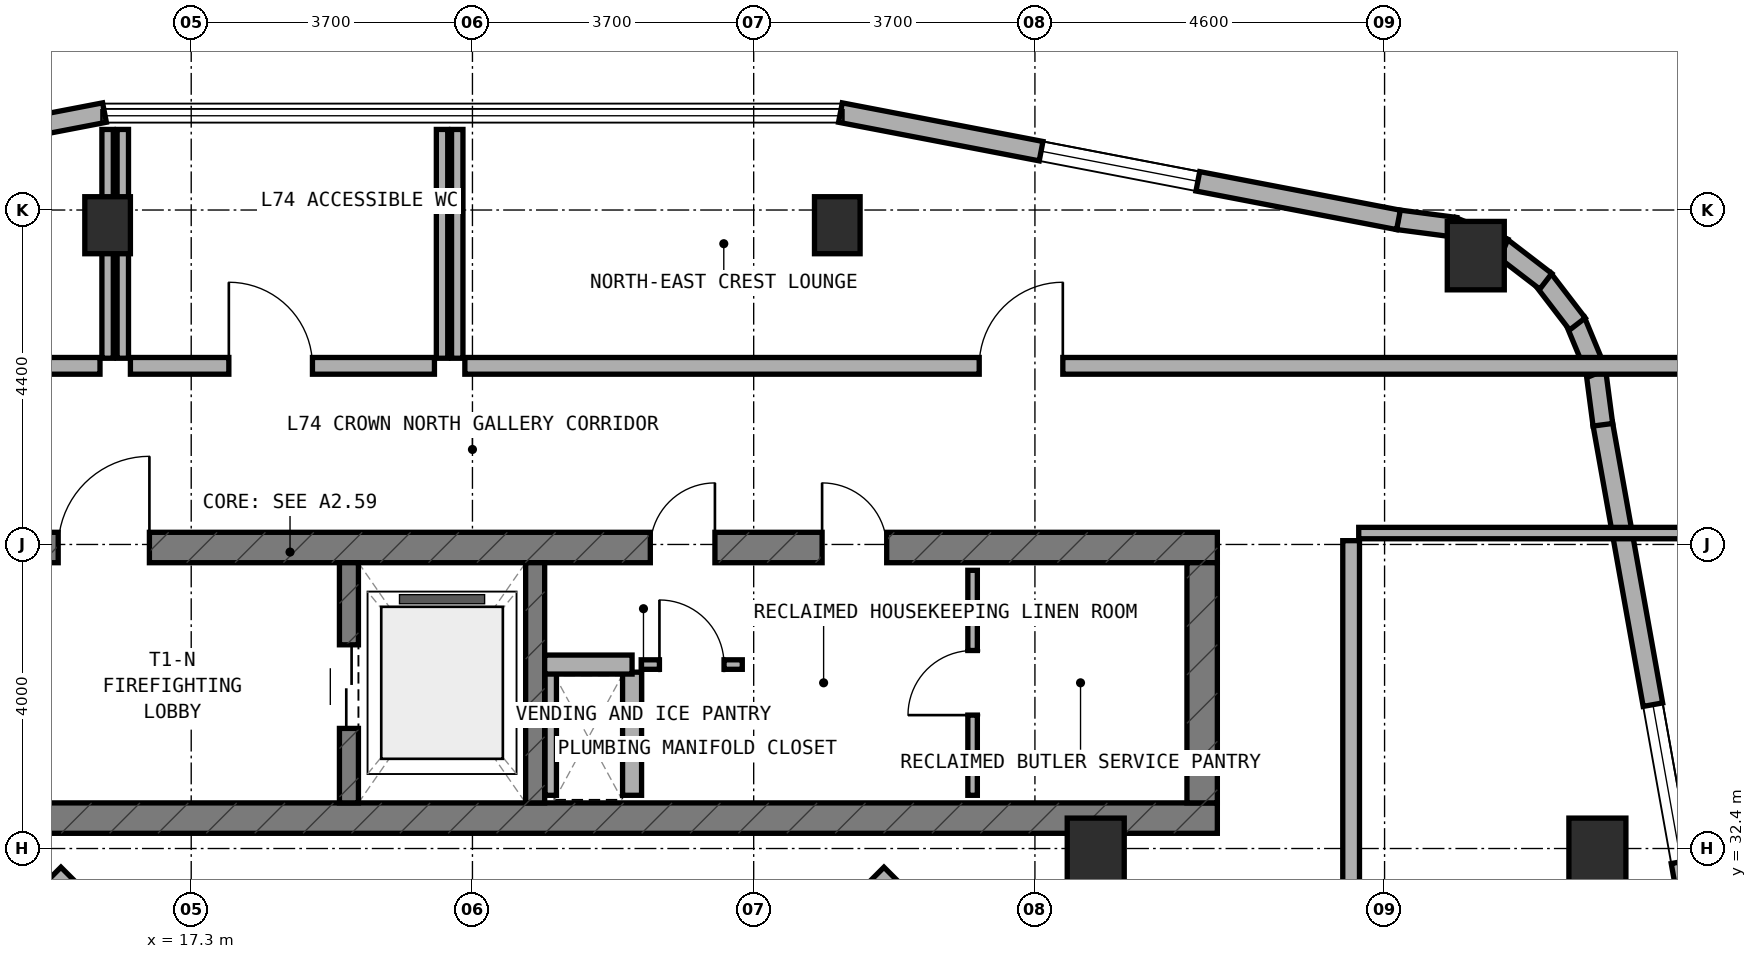
"""IFC4 building model, lengths in metres.
Left out: names, types, materials, properties, quantities, classifications, styles, units other than length and angle.
Written with IfcOpenShell. Run it as: python <this file> out.ifc"""

import sys

from ifc_helpers import new_model, si_unit, direction, frame, frame_2d, origin, origin_2d, place, context, subcontext, project, spatial, rectangle, extrude, element, fill, save


model = new_model("IFC4")
c1 = context("Model", 3, precision=1e-05, world=origin(), true_north=direction((0.0, 1.0)))
c2 = subcontext(c1, "Body", "Model", "MODEL_VIEW")
j1 = project(units=[si_unit("LENGTHUNIT", "METRE"), si_unit("PLANEANGLEUNIT", "RADIAN")], contexts=[c1])
p1 = place(None, origin())
s1 = spatial("IfcSite", under=j1, at=p1, CompositionType="ELEMENT")
p2 = place(p1, origin())
s2 = spatial("IfcBuilding", under=s1, at=p2, CompositionType="ELEMENT")
p3 = place(p2, frame((0.0, 0.0, 272.0)))
s3 = spatial("IfcBuildingStorey", under=s2, at=p3, CompositionType="ELEMENT", Elevation=272.0)
p4 = place(p3, frame((6.4, 32.8, 0.0), z_axis=(0.0, 0.0, 1.0), x_axis=(1.0, 0.0, 0.0)))
e1 = element("IfcWall", 1, at=p4, inside=s3, PredefinedType="SHEAR", context=c2, shape_type="SweptSolid", body=[
    extrude(rectangle(XDim=24.4, YDim=0.4, at=frame_2d((12.2, 0.0))), origin(), (0.0, 0.0, 1.0), 4.56),
])
p5 = place(p4, frame((6.05, 0.0, 0.0)))
e2 = element("IfcOpeningElement", 2, at=p5, cuts=e1, PredefinedType="OPENING", context=c2, shape_type="SweptSolid", body=[
    extrude(rectangle(XDim=1.1, YDim=2.15, at=frame_2d((0.55, 1.075))), frame((0.0, 0.21, 0.0), z_axis=(0.0, -1.0, 0.0), x_axis=(1.0, 0.0, 0.0)), (0.0, 0.0, 1.0), 0.42),
])
p6 = place(p3, frame((6.4, 36.36, 0.0), z_axis=(0.0, 0.0, 1.0), x_axis=(1.0, 0.0, 0.0)))
e3 = element("IfcWall", 3, at=p6, inside=s3, PredefinedType="SHEAR", context=c2, shape_type="SweptSolid", body=[
    extrude(rectangle(XDim=24.4, YDim=0.4, at=frame_2d((12.2, 0.0))), origin(), (0.0, 0.0, 1.0), 4.56),
])
p7 = place(p6, frame((9.15, 0.0, 0.0)))
e4 = element("IfcOpeningElement", 4, at=p7, cuts=e3, PredefinedType="OPENING", context=c2, shape_type="SweptSolid", body=[
    extrude(rectangle(XDim=1.2, YDim=2.15, at=frame_2d((0.6, 1.075))), frame((0.0, 0.21, 0.0), z_axis=(0.0, -1.0, 0.0), x_axis=(1.0, 0.0, 0.0)), (0.0, 0.0, 1.0), 0.42),
])
p8 = place(p6, frame((19.2, 0.0, 0.0)))
e5 = element("IfcOpeningElement", 5, at=p8, cuts=e3, PredefinedType="OPENING", context=c2, shape_type="SweptSolid", body=[
    extrude(rectangle(XDim=0.85, YDim=2.1, at=frame_2d((0.425, 1.05))), frame((0.0, 0.21, 0.0), z_axis=(0.0, -1.0, 0.0), x_axis=(1.0, 0.0, 0.0)), (0.0, 0.0, 1.0), 0.42),
])
p9 = place(p6, frame((16.94, 0.0, 0.0)))
e6 = element("IfcOpeningElement", 6, at=p9, cuts=e3, PredefinedType="OPENING", context=c2, shape_type="SweptSolid", body=[
    extrude(rectangle(XDim=0.85, YDim=2.1, at=frame_2d((0.425, 1.05))), frame((0.0, 0.21, 0.0), z_axis=(0.0, -1.0, 0.0), x_axis=(1.0, 0.0, 0.0)), (0.0, 0.0, 1.0), 0.42),
])
p10 = place(p3, frame((30.6, 33.0, 0.0), z_axis=(0.0, 0.0, 1.0), x_axis=(0.0, 1.0, 0.0)))
e7 = element("IfcWall", 7, at=p10, inside=s3, PredefinedType="SHEAR", context=c2, shape_type="SweptSolid", body=[
    extrude(rectangle(XDim=3.16, YDim=0.4, at=frame_2d((1.58, 0.0))), origin(), (0.0, 0.0, 1.0), 4.56),
])
p11 = place(p3, frame((19.375, 33.0, 0.0), z_axis=(0.0, 0.0, 1.0), x_axis=(0.0, 1.0, 0.0)))
e8 = element("IfcWall", 8, at=p11, inside=s3, PredefinedType="STANDARD", context=c2, shape_type="SweptSolid", body=[
    extrude(rectangle(XDim=3.16, YDim=0.25, at=frame_2d((1.58, 0.0))), origin(), (0.0, 0.0, 1.0), 4.52),
])
p12 = place(p11, frame((0.98, 0.0, 0.0)))
e9 = element("IfcOpeningElement", 9, at=p12, cuts=e8, PredefinedType="OPENING", context=c2, shape_type="SweptSolid", body=[
    extrude(rectangle(XDim=1.1, YDim=2.15, at=frame_2d((0.55, 1.075))), frame((0.0, 0.135, 0.0), z_axis=(0.0, -1.0, 0.0), x_axis=(1.0, 0.0, 0.0)), (0.0, 0.0, 1.0), 0.27),
])
p13 = place(p3, frame((21.825, 33.0, 0.0), z_axis=(0.0, 0.0, 1.0), x_axis=(0.0, 1.0, 0.0)))
e10 = element("IfcWall", 10, at=p13, inside=s3, PredefinedType="STANDARD", context=c2, shape_type="SweptSolid", body=[
    extrude(rectangle(XDim=3.16, YDim=0.25, at=frame_2d((1.58, 0.0))), origin(), (0.0, 0.0, 1.0), 4.52),
])
for number, where, z_axis, x_axis in (
    (11, (16.2, 40.6, 0.0), (0.0, 0.0, 1.0), (1.0, 0.0, 0.0)),
    (12, (25.8, 40.6, 0.0), (0.0, 0.0, 1.0), (1.0, 0.0, 0.0)),
):
    element("IfcColumn", number, at=place(p3, frame(where, z_axis=z_axis, x_axis=x_axis)), inside=s3, PredefinedType="COLUMN", context=c2, shape_type="SweptSolid", body=[
        extrude(rectangle(XDim=0.6, YDim=0.75, at=origin_2d()), origin(), (0.0, 0.0, 1.0), 4.8),
    ])
for number, where, z_axis, x_axis in (
    (13, (34.2, 40.2, 0.0), (0.0, 0.0, 1.0), (1.0, 0.0, 0.0)),
    (14, (35.8, 32.35, 0.0), (0.0, 0.0, 1.0), (1.0, 0.0, 0.0)),
    (15, (29.2, 32.35, 0.0), (0.0, 0.0, 1.0), (1.0, 0.0, 0.0)),
):
    element("IfcColumn", number, at=place(p3, frame(where, z_axis=z_axis, x_axis=x_axis)), inside=s3, PredefinedType="COLUMN", context=c2, shape_type="SweptSolid", body=[
        extrude(rectangle(XDim=0.75, YDim=0.9, at=origin_2d()), origin(), (0.0, 0.0, 1.0), 4.8),
    ])
p14 = place(p3, frame((37.282, 30.083, 0.0), z_axis=(0.0, 0.0, 1.0), x_axis=(-0.175766426993, 0.984431898682, 0.0)))
e16 = element("IfcWall", 16, at=p14, inside=s3, PredefinedType="STANDARD", context=c2, shape_type="SweptSolid", body=[
    extrude(rectangle(XDim=8.027, YDim=0.26, at=frame_2d((4.014, 0.0))), origin(), (0.0, 0.0, 1.0), 2.74),
])
p15 = place(p14, frame((2.176, 0.0, 0.85)))
e17 = element("IfcOpeningElement", 17, at=p15, cuts=e16, PredefinedType="OPENING", context=c2, shape_type="SweptSolid", body=[
    extrude(rectangle(XDim=2.1, YDim=1.5, at=frame_2d((1.05, 0.75))), frame((0.0, 0.14, 0.0), z_axis=(0.0, -1.0, 0.0), x_axis=(1.0, 0.0, 0.0)), (0.0, 0.0, 1.0), 0.28),
])
p16 = place(p3, frame((35.872, 37.975, 0.0), z_axis=(0.0, 0.0, 1.0), x_axis=(-0.130255288807, 0.991480488834, 0.0)))
e18 = element("IfcWall", 18, at=p16, inside=s3, PredefinedType="STANDARD", context=c2, shape_type="SweptSolid", body=[
    extrude(rectangle(XDim=0.729, YDim=0.26, at=frame_2d((0.365, 0.0))), origin(), (0.0, 0.0, 1.0), 2.74),
])
p17 = place(p3, frame((35.795, 38.652, 0.0), z_axis=(0.0, 0.0, 1.0), x_axis=(-0.383267045233, 0.923637576129, 0.0)))
e19 = element("IfcWall", 19, at=p17, inside=s3, PredefinedType="STANDARD", context=c2, shape_type="SweptSolid", body=[
    extrude(rectangle(XDim=0.746, YDim=0.26, at=frame_2d((0.373, 0.0))), origin(), (0.0, 0.0, 1.0), 2.74),
])
for number, where, z_axis, x_axis in (
    (20, (35.537, 39.301, 0.0), (0.0, 0.0, 1.0), (-0.609, 0.793, 0.0)),
    (21, (35.121, 39.862, 0.0), (0.0, 0.0, 1.0), (-0.794, 0.608, 0.0)),
    (22, (34.573, 40.295, 0.0), (0.0, 0.0, 1.0), (-0.924, 0.384, 0.0)),
):
    element("IfcWall", number, at=place(p3, frame(where, z_axis=z_axis, x_axis=x_axis)), inside=s3, PredefinedType="STANDARD", context=c2, shape_type="SweptSolid", body=[
        extrude(rectangle(XDim=0.746, YDim=0.26, at=frame_2d((0.373, 0.0))), origin(), (0.0, 0.0, 1.0), 2.74),
    ])
p18 = place(p3, frame((33.933, 40.573, 0.0), z_axis=(0.0, 0.0, 1.0), x_axis=(-0.991559404866, 0.129653178221, 0.0)))
e23 = element("IfcWall", 23, at=p18, inside=s3, PredefinedType="STANDARD", context=c2, shape_type="SweptSolid", body=[
    extrude(rectangle(XDim=0.764, YDim=0.26, at=frame_2d((0.382, 0.0))), origin(), (0.0, 0.0, 1.0), 2.74),
])
p19 = place(p3, frame((33.183, 40.67, 0.0), z_axis=(0.0, 0.0, 1.0), x_axis=(-0.982002021426, 0.188870405079, 0.0)))
e24 = element("IfcWall", 24, at=p19, inside=s3, PredefinedType="STANDARD", context=c2, shape_type="SweptSolid", body=[
    extrude(rectangle(XDim=7.477, YDim=0.26, at=frame_2d((3.738, 0.0))), origin(), (0.0, 0.0, 1.0), 2.74),
])
p20 = place(p19, frame((2.688, 0.0, 0.85)))
e25 = element("IfcOpeningElement", 25, at=p20, cuts=e24, PredefinedType="OPENING", context=c2, shape_type="SweptSolid", body=[
    extrude(rectangle(XDim=2.1, YDim=1.5, at=frame_2d((1.05, 0.75))), frame((0.0, 0.14, 0.0), z_axis=(0.0, -1.0, 0.0), x_axis=(1.0, 0.0, 0.0)), (0.0, 0.0, 1.0), 0.28),
])
p21 = place(p3, frame((16.159, 42.082, 0.0), z_axis=(0.0, 0.0, 1.0), x_axis=(-0.982002021426, -0.188870405079, 0.0)))
e26 = element("IfcWall", 26, at=p21, inside=s3, PredefinedType="STANDARD", context=c2, shape_type="SweptSolid", body=[
    extrude(rectangle(XDim=7.477, YDim=0.26, at=frame_2d((3.738, 0.0))), origin(), (0.0, 0.0, 1.0), 2.74),
])
p22 = place(p21, frame((2.728, 0.0, 0.85)))
e27 = element("IfcOpeningElement", 27, at=p22, cuts=e26, PredefinedType="OPENING", context=c2, shape_type="SweptSolid", body=[
    extrude(rectangle(XDim=2.1, YDim=1.5, at=frame_2d((1.05, 0.75))), frame((0.0, 0.14, 0.0), z_axis=(0.0, -1.0, 0.0), x_axis=(1.0, 0.0, 0.0)), (0.0, 0.0, 1.0), 0.28),
])
for number, where, z_axis, x_axis in (
    (28, (27.956, 30.428, 0.0), (0.0, 0.0, 1.0), (-0.707, 0.707, 0.0)),
    (29, (15.678, 32.062, 0.0), (0.0, 0.0, 1.0), (-0.707, -0.707, 0.0)),
):
    element("IfcWall", number, at=place(p3, frame(where, z_axis=z_axis, x_axis=x_axis)), inside=s3, PredefinedType="STANDARD", context=c2, shape_type="SweptSolid", body=[
        extrude(rectangle(XDim=2.311, YDim=0.26, at=frame_2d((1.155, 0.0))), origin(), (0.0, 0.0, 1.0), 2.74),
    ])
p23 = place(p3, frame((27.58, 33.1, 0.0), z_axis=(0.0, 0.0, 1.0), x_axis=(0.0, 1.0, 0.0)))
e30 = element("IfcWall", 30, at=p23, inside=s3, PredefinedType="PARTITIONING", context=c2, shape_type="SweptSolid", body=[
    extrude(rectangle(XDim=2.96, YDim=0.125, at=frame_2d((1.48, 0.0))), origin(), (0.0, 0.0, 1.0), 2.72),
])
p24 = place(p23, frame((1.055, 0.0, 0.0)))
e31 = element("IfcOpeningElement", 31, at=p24, cuts=e30, PredefinedType="OPENING", context=c2, shape_type="SweptSolid", body=[
    extrude(rectangle(XDim=0.85, YDim=2.1, at=frame_2d((0.425, 1.05))), frame((0.0, 0.073, 0.0), z_axis=(0.0, -1.0, 0.0), x_axis=(1.0, 0.0, 0.0)), (0.0, 0.0, 1.0), 0.145),
])
p25 = place(p3, frame((22.03, 33.1, 0.0), z_axis=(0.0, 0.0, 1.0), x_axis=(0.0, 1.0, 0.0)))
e32 = element("IfcWall", 32, at=p25, inside=s3, PredefinedType="PARTITIONING", context=c2, shape_type="SweptSolid", body=[
    extrude(rectangle(XDim=1.62, YDim=0.15, at=frame_2d((0.81, 0.0))), origin(), (0.0, 0.0, 1.0), 2.72),
])
p26 = place(p3, frame((23.1, 33.1, 0.0), z_axis=(0.0, 0.0, 1.0), x_axis=(0.0, 1.0, 0.0)))
e33 = element("IfcWall", 33, at=p26, inside=s3, PredefinedType="SOLIDWALL", context=c2, shape_type="SweptSolid", body=[
    extrude(rectangle(XDim=1.62, YDim=0.25, at=frame_2d((0.81, 0.0))), origin(), (0.0, 0.0, 1.0), 2.72),
])
p27 = place(p3, frame((21.95, 34.82, 0.0), z_axis=(0.0, 0.0, 1.0), x_axis=(1.0, 0.0, 0.0)))
e34 = element("IfcWall", 34, at=p27, inside=s3, PredefinedType="SOLIDWALL", context=c2, shape_type="SweptSolid", body=[
    extrude(rectangle(XDim=1.15, YDim=0.25, at=frame_2d((0.575, 0.0))), origin(), (0.0, 0.0, 1.0), 2.72),
])
p28 = place(p3, frame((23.22, 34.82, 0.0), z_axis=(0.0, 0.0, 1.0), x_axis=(1.0, 0.0, 0.0)))
e35 = element("IfcWall", 35, at=p28, inside=s3, PredefinedType="PARTITIONING", context=c2, shape_type="SweptSolid", body=[
    extrude(rectangle(XDim=1.33, YDim=0.125, at=frame_2d((0.665, 0.0))), origin(), (0.0, 0.0, 1.0), 2.72),
])
p29 = place(p28, frame((0.24, 0.0, 0.0)))
e36 = element("IfcOpeningElement", 36, at=p29, cuts=e35, PredefinedType="OPENING", context=c2, shape_type="SweptSolid", body=[
    extrude(rectangle(XDim=0.85, YDim=2.1, at=frame_2d((0.425, 1.05))), frame((0.0, 0.073, 0.0), z_axis=(0.0, -1.0, 0.0), x_axis=(1.0, 0.0, 0.0)), (0.0, 0.0, 1.0), 0.145),
])
p30 = place(p3, frame((32.66, 36.55, 0.0), z_axis=(0.0, 0.0, 1.0), x_axis=(1.0, 0.0, 0.0)))
e37 = element("IfcWall", 37, at=p30, inside=s3, PredefinedType="PARTITIONING", context=c2, shape_type="SweptSolid", body=[
    extrude(rectangle(XDim=4.4, YDim=0.15, at=frame_2d((2.2, 0.0))), origin(), (0.0, 0.0, 1.0), 2.72),
])
p31 = place(p3, frame((32.56, 13.55, 0.0), z_axis=(0.0, 0.0, 1.0), x_axis=(0.0, 1.0, 0.0)))
e38 = element("IfcWall", 38, at=p31, inside=s3, PredefinedType="SOLIDWALL", context=c2, shape_type="SweptSolid", body=[
    extrude(rectangle(XDim=22.9, YDim=0.22, at=frame_2d((11.45, 0.0))), origin(), (0.0, 0.0, 1.0), 2.72),
])
p32 = place(p31, frame((9.8, 0.0, 0.0)))
e39 = element("IfcOpeningElement", 39, at=p32, cuts=e38, PredefinedType="OPENING", context=c2, shape_type="SweptSolid", body=[
    extrude(rectangle(XDim=1.1, YDim=2.1, at=frame_2d((0.55, 1.05))), frame((0.0, 0.12, 0.0), z_axis=(0.0, -1.0, 0.0), x_axis=(1.0, 0.0, 0.0)), (0.0, 0.0, 1.0), 0.24),
])
p33 = place(p3, frame((16.2, 38.85, 0.0), z_axis=(0.0, 0.0, 1.0), x_axis=(0.0, 1.0, 0.0)))
e40 = element("IfcWall", 40, at=p33, inside=s3, PredefinedType="PARTITIONING", context=c2, shape_type="SweptSolid", body=[
    extrude(rectangle(XDim=3.01, YDim=0.15, at=frame_2d((1.505, 0.0))), origin(), (0.0, 0.0, 1.0), 2.72),
])
p34 = place(p3, frame((4.94, 38.75, 0.0), z_axis=(0.0, 0.0, 1.0), x_axis=(1.0, 0.0, 0.0)))
e41 = element("IfcWall", 41, at=p34, inside=s3, PredefinedType="SOLIDWALL", context=c2, shape_type="SweptSolid", body=[
    extrude(rectangle(XDim=11.16, YDim=0.22, at=frame_2d((5.58, 0.0))), origin(), (0.0, 0.0, 1.0), 2.72),
])
p35 = place(p34, frame((4.517, 0.0, 0.0)))
e42 = element("IfcOpeningElement", 42, at=p35, cuts=e41, PredefinedType="OPENING", context=c2, shape_type="SweptSolid", body=[
    extrude(rectangle(XDim=1.1, YDim=2.1, at=frame_2d((0.55, 1.05))), frame((0.0, 0.12, 0.0), z_axis=(0.0, -1.0, 0.0), x_axis=(1.0, 0.0, 0.0)), (0.0, 0.0, 1.0), 0.24),
])
for number, where, z_axis, x_axis in (
    (43, (16.4, 38.85, 0.0), (0.0, 0.0, 1.0), (0.0, 1.0, 0.0)),
    (44, (20.6, 38.85, 0.0), (0.0, 0.0, 1.0), (0.0, 1.0, 0.0)),
):
    element("IfcWall", number, at=place(p3, frame(where, z_axis=z_axis, x_axis=x_axis)), inside=s3, PredefinedType="PARTITIONING", context=c2, shape_type="SweptSolid", body=[
        extrude(rectangle(XDim=3.01, YDim=0.15, at=frame_2d((1.505, 0.0))), origin(), (0.0, 0.0, 1.0), 2.72),
    ])
p36 = place(p3, frame((16.5, 38.75, 0.0), z_axis=(0.0, 0.0, 1.0), x_axis=(1.0, 0.0, 0.0)))
e45 = element("IfcWall", 45, at=p36, inside=s3, PredefinedType="SOLIDWALL", context=c2, shape_type="SweptSolid", body=[
    extrude(rectangle(XDim=4.0, YDim=0.22, at=frame_2d((2.0, 0.0))), origin(), (0.0, 0.0, 1.0), 2.72),
])
p37 = place(p36, frame((1.295, 0.0, 0.0)))
e46 = element("IfcOpeningElement", 46, at=p37, cuts=e45, PredefinedType="OPENING", context=c2, shape_type="SweptSolid", body=[
    extrude(rectangle(XDim=1.1, YDim=2.1, at=frame_2d((0.55, 1.05))), frame((0.0, 0.12, 0.0), z_axis=(0.0, -1.0, 0.0), x_axis=(1.0, 0.0, 0.0)), (0.0, 0.0, 1.0), 0.24),
])
p38 = place(p3, frame((20.8, 38.85, 0.0), z_axis=(0.0, 0.0, 1.0), x_axis=(0.0, 1.0, 0.0)))
e47 = element("IfcWall", 47, at=p38, inside=s3, PredefinedType="PARTITIONING", context=c2, shape_type="SweptSolid", body=[
    extrude(rectangle(XDim=3.01, YDim=0.15, at=frame_2d((1.505, 0.0))), origin(), (0.0, 0.0, 1.0), 2.72),
])
p39 = place(p3, frame((20.9, 38.75, 0.0), z_axis=(0.0, 0.0, 1.0), x_axis=(1.0, 0.0, 0.0)))
e48 = element("IfcWall", 48, at=p39, inside=s3, PredefinedType="SOLIDWALL", context=c2, shape_type="SweptSolid", body=[
    extrude(rectangle(XDim=16.16, YDim=0.22, at=frame_2d((8.08, 0.0))), origin(), (0.0, 0.0, 1.0), 2.72),
])
p40 = place(p39, frame((6.767, 0.0, 0.0)))
e49 = element("IfcOpeningElement", 49, at=p40, cuts=e48, PredefinedType="OPENING", context=c2, shape_type="SweptSolid", body=[
    extrude(rectangle(XDim=1.1, YDim=2.1, at=frame_2d((0.55, 1.05))), frame((0.0, 0.12, 0.0), z_axis=(0.0, -1.0, 0.0), x_axis=(1.0, 0.0, 0.0)), (0.0, 0.0, 1.0), 0.24),
])
p41 = place(p15, origin())
e50 = element("IfcWindow", 50, at=p41, inside=s3, PartitioningType="SINGLE_PANEL", PredefinedType="WINDOW", context=c2, shape_type="SweptSolid", body=[
    extrude(rectangle(XDim=2.1, YDim=1.5, at=frame_2d((1.05, 0.75))), frame((0.0, 0.03, 0.0), z_axis=(0.0, -1.0, 0.0), x_axis=(1.0, 0.0, 0.0)), (0.0, 0.0, 1.0), 0.06),
])
fill(e17, e50)
p42 = place(p20, origin())
e51 = element("IfcWindow", 51, at=p42, inside=s3, PartitioningType="SINGLE_PANEL", PredefinedType="WINDOW", context=c2, shape_type="SweptSolid", body=[
    extrude(rectangle(XDim=2.1, YDim=1.5, at=frame_2d((1.05, 0.75))), frame((0.0, 0.03, 0.0), z_axis=(0.0, -1.0, 0.0), x_axis=(1.0, 0.0, 0.0)), (0.0, 0.0, 1.0), 0.06),
])
fill(e25, e51)
p43 = place(p7, origin())
e52 = element("IfcDoor", 52, at=p43, inside=s3, OperationType="SINGLE_SWING_RIGHT", PredefinedType="DOOR", context=c2, shape_type="SweptSolid", body=[
    extrude(rectangle(XDim=1.2, YDim=2.15, at=frame_2d((0.6, 1.075))), frame((0.0, 0.025, 0.0), z_axis=(0.0, -1.0, 0.0), x_axis=(1.0, 0.0, 0.0)), (0.0, 0.0, 1.0), 0.05),
])
fill(e4, e52)
p44 = place(p12, origin())
e53 = element("IfcDoor", 53, at=p44, inside=s3, OperationType="DOUBLE_DOOR_SLIDING", PredefinedType="DOOR", context=c2, shape_type="SweptSolid", body=[
    extrude(rectangle(XDim=1.1, YDim=2.15, at=frame_2d((0.55, 1.075))), frame((0.0, 0.025, 0.0), z_axis=(0.0, -1.0, 0.0), x_axis=(1.0, 0.0, 0.0)), (0.0, 0.0, 1.0), 0.05),
])
fill(e9, e53)
p45 = place(p8, origin())
e54 = element("IfcDoor", 54, at=p45, inside=s3, OperationType="SINGLE_SWING_LEFT", PredefinedType="DOOR", context=c2, shape_type="SweptSolid", body=[
    extrude(rectangle(XDim=0.85, YDim=2.1, at=frame_2d((0.425, 1.05))), frame((0.0, 0.025, 0.0), z_axis=(0.0, -1.0, 0.0), x_axis=(1.0, 0.0, 0.0)), (0.0, 0.0, 1.0), 0.05),
])
fill(e5, e54)
p46 = place(p9, origin())
e55 = element("IfcDoor", 55, at=p46, inside=s3, OperationType="SINGLE_SWING_RIGHT", PredefinedType="DOOR", context=c2, shape_type="SweptSolid", body=[
    extrude(rectangle(XDim=0.85, YDim=2.1, at=frame_2d((0.425, 1.05))), frame((0.0, 0.025, 0.0), z_axis=(0.0, -1.0, 0.0), x_axis=(1.0, 0.0, 0.0)), (0.0, 0.0, 1.0), 0.05),
])
fill(e6, e55)
p47 = place(p24, origin())
e56 = element("IfcDoor", 56, at=p47, inside=s3, OperationType="SINGLE_SWING_LEFT", PredefinedType="DOOR", context=c2, shape_type="SweptSolid", body=[
    extrude(rectangle(XDim=0.85, YDim=2.1, at=frame_2d((0.425, 1.05))), frame((0.0, 0.025, 0.0), z_axis=(0.0, -1.0, 0.0), x_axis=(1.0, 0.0, 0.0)), (0.0, 0.0, 1.0), 0.05),
])
fill(e31, e56)
p48 = place(p29, origin())
e57 = element("IfcDoor", 57, at=p48, inside=s3, OperationType="SINGLE_SWING_LEFT", PredefinedType="DOOR", context=c2, shape_type="SweptSolid", body=[
    extrude(rectangle(XDim=0.85, YDim=2.1, at=frame_2d((0.425, 1.05))), frame((0.0, 0.025, 0.0), z_axis=(0.0, -1.0, 0.0), x_axis=(1.0, 0.0, 0.0)), (0.0, 0.0, 1.0), 0.05),
])
fill(e36, e57)
p49 = place(p37, origin())
e58 = element("IfcDoor", 58, at=p49, inside=s3, OperationType="SINGLE_SWING_LEFT", PredefinedType="DOOR", context=c2, shape_type="SweptSolid", body=[
    extrude(rectangle(XDim=1.1, YDim=2.1, at=frame_2d((0.55, 1.05))), frame((0.0, 0.025, 0.0), z_axis=(0.0, -1.0, 0.0), x_axis=(1.0, 0.0, 0.0)), (0.0, 0.0, 1.0), 0.05),
])
fill(e46, e58)
p50 = place(p40, origin())
e59 = element("IfcDoor", 59, at=p50, inside=s3, OperationType="SINGLE_SWING_RIGHT", PredefinedType="DOOR", context=c2, shape_type="SweptSolid", body=[
    extrude(rectangle(XDim=1.1, YDim=2.1, at=frame_2d((0.55, 1.05))), frame((0.0, 0.025, 0.0), z_axis=(0.0, -1.0, 0.0), x_axis=(1.0, 0.0, 0.0)), (0.0, 0.0, 1.0), 0.05),
])
fill(e49, e59)
save(model, sys.argv[1])
